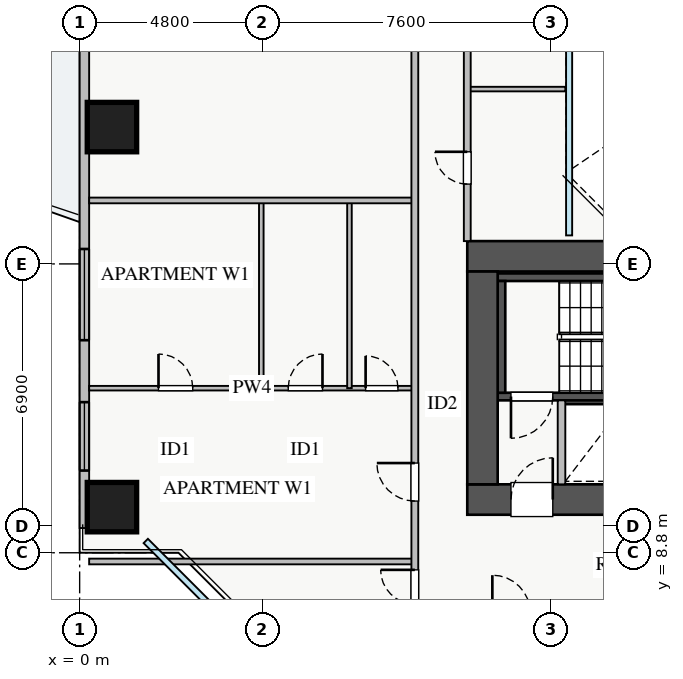
"""IFC4 building model, lengths in metres.
Left out: names, types, materials, properties, quantities, classifications, styles, units other than length and angle.
Written with IfcOpenShell. Run it as: python <this file> out.ifc"""

import sys

from ifc_helpers import new_model, si_unit, direction, frame, frame_2d, origin, origin_2d, place, context, subcontext, project, spatial, rectangle, extrude, source, transform, mapped, element, fill, save


model = new_model("IFC4")
c1 = context("Model", 3, precision=1e-05, world=origin(), true_north=direction((0.0, 1.0)))
c2 = subcontext(c1, "Body", "Model", "MODEL_VIEW")
j1 = project(units=[si_unit("LENGTHUNIT", "METRE"), si_unit("PLANEANGLEUNIT", "RADIAN")], contexts=[c1])
p1 = place(None, origin())
s1 = spatial("IfcSite", under=j1, at=p1, CompositionType="ELEMENT")
p2 = place(p1, origin())
s2 = spatial("IfcBuilding", under=s1, at=p2, CompositionType="ELEMENT")
p3 = place(p2, frame((0.0, 0.0, 50.25)))
s3 = spatial("IfcBuildingStorey", under=s2, at=p3, CompositionType="ELEMENT", Elevation=50.25)
p4 = place(p3, frame((12.68, 12.8, 0.0), z_axis=(0.0, 0.0, 1.0), x_axis=(1.0, 0.0, 0.0)))
e1 = element("IfcWall", 1, at=p4, inside=s3, PredefinedType="SHEAR", context=c2, shape_type="SweptSolid", body=[
    extrude(rectangle(XDim=1.94, YDim=0.18, at=frame_2d((0.97, 0.0))), origin(), (0.0, 0.0, 1.0), 3.07),
])
p5 = place(p3, frame((11.0, 12.91, 0.0), z_axis=(0.0, 0.0, 1.0), x_axis=(1.0, 0.0, 0.0)))
e2 = element("IfcWall", 2, at=p5, inside=s3, PredefinedType="SHEAR", context=c2, shape_type="SweptSolid", body=[
    extrude(rectangle(XDim=7.15, YDim=0.2, at=frame_2d((3.575, 0.0))), origin(), (0.0, 0.0, 1.0), 3.25),
])
p6 = place(p5, frame((0.35, 0.0, 0.0)))
e3 = element("IfcOpeningElement", 3, at=p6, cuts=e2, PredefinedType="OPENING", context=c2, shape_type="SweptSolid", body=[
    extrude(rectangle(XDim=1.1, YDim=2.05, at=frame_2d((0.55, 1.025))), frame((0.0, 0.11, 0.0), z_axis=(0.0, -1.0, 0.0), x_axis=(1.0, 0.0, 0.0)), (0.0, 0.0, 1.0), 0.22),
])
p7 = place(p3, frame((11.0, 16.05, 0.0), z_axis=(0.0, 0.0, 1.0), x_axis=(1.0, 0.0, 0.0)))
e4 = element("IfcWall", 4, at=p7, inside=s3, PredefinedType="SHEAR", context=c2, shape_type="SweptSolid", body=[
    extrude(rectangle(XDim=7.15, YDim=0.2, at=frame_2d((3.575, 0.0))), origin(), (0.0, 0.0, 1.0), 3.25),
])
p8 = place(p3, frame((11.1, 13.01, 0.0), z_axis=(0.0, 0.0, 1.0), x_axis=(0.0, 1.0, 0.0)))
e5 = element("IfcWall", 5, at=p8, inside=s3, PredefinedType="SHEAR", context=c2, shape_type="SweptSolid", body=[
    extrude(rectangle(XDim=2.94, YDim=0.2, at=frame_2d((1.47, 0.0))), origin(), (0.0, 0.0, 1.0), 3.25),
])
p9 = place(p3, frame((10.2, 10.2, 0.0), z_axis=(0.0, 0.0, 1.0), x_axis=(1.0, 0.0, 0.0)))
e6 = element("IfcWall", 6, at=p9, inside=s3, PredefinedType="SHEAR", context=c2, shape_type="SweptSolid", body=[
    extrude(rectangle(XDim=17.6, YDim=0.8, at=frame_2d((8.8, 0.0))), origin(), (0.0, 0.0, 1.0), 3.25),
])
p10 = place(p9, frame((1.15, 0.0, 0.0)))
e7 = element("IfcOpeningElement", 7, at=p10, cuts=e6, PredefinedType="OPENING", context=c2, shape_type="SweptSolid", body=[
    extrude(rectangle(XDim=1.1, YDim=2.05, at=frame_2d((0.55, 1.025))), frame((0.0, 0.41, 0.0), z_axis=(0.0, -1.0, 0.0), x_axis=(1.0, 0.0, 0.0)), (0.0, 0.0, 1.0), 0.82),
])
p11 = place(p9, frame((8.3, 0.0, 0.0)))
e8 = element("IfcOpeningElement", 8, at=p11, cuts=e6, PredefinedType="OPENING", context=c2, shape_type="SweptSolid", body=[
    extrude(rectangle(XDim=1.1, YDim=2.05, at=frame_2d((0.55, 1.025))), frame((0.0, 0.41, 0.0), z_axis=(0.0, -1.0, 0.0), x_axis=(1.0, 0.0, 0.0)), (0.0, 0.0, 1.0), 0.82),
])
p12 = place(p9, frame((10.05, 0.0, 0.0)))
e9 = element("IfcOpeningElement", 9, at=p12, cuts=e6, PredefinedType="OPENING", context=c2, shape_type="SweptSolid", body=[
    extrude(rectangle(XDim=1.1, YDim=2.05, at=frame_2d((0.55, 1.025))), frame((0.0, 0.41, 0.0), z_axis=(0.0, -1.0, 0.0), x_axis=(1.0, 0.0, 0.0)), (0.0, 0.0, 1.0), 0.82),
])
p13 = place(p9, frame((14.74, 0.0, 0.0)))
e10 = element("IfcOpeningElement", 10, at=p13, cuts=e6, PredefinedType="OPENING", context=c2, shape_type="SweptSolid", body=[
    extrude(rectangle(XDim=1.0, YDim=2.05, at=frame_2d((0.5, 1.025))), frame((0.0, 0.41, 0.0), z_axis=(0.0, -1.0, 0.0), x_axis=(1.0, 0.0, 0.0)), (0.0, 0.0, 1.0), 0.82),
])
p14 = place(p9, frame((12.585, 0.0, 0.0)))
e11 = element("IfcOpeningElement", 11, at=p14, cuts=e6, PredefinedType="OPENING", context=c2, shape_type="SweptSolid", body=[
    extrude(rectangle(XDim=1.0, YDim=2.05, at=frame_2d((0.5, 1.025))), frame((0.0, 0.41, 0.0), z_axis=(0.0, -1.0, 0.0), x_axis=(1.0, 0.0, 0.0)), (0.0, 0.0, 1.0), 0.82),
])
p15 = place(p3, frame((10.2, 16.6, 0.0), z_axis=(0.0, 0.0, 1.0), x_axis=(1.0, 0.0, 0.0)))
e12 = element("IfcWall", 12, at=p15, inside=s3, PredefinedType="SHEAR", context=c2, shape_type="SweptSolid", body=[
    extrude(rectangle(XDim=17.6, YDim=0.8, at=frame_2d((8.8, 0.0))), origin(), (0.0, 0.0, 1.0), 3.25),
])
p16 = place(p3, frame((10.6, 10.6, 0.0), z_axis=(0.0, 0.0, 1.0), x_axis=(0.0, 1.0, 0.0)))
e13 = element("IfcWall", 13, at=p16, inside=s3, PredefinedType="SHEAR", context=c2, shape_type="SweptSolid", body=[
    extrude(rectangle(XDim=5.6, YDim=0.8, at=frame_2d((2.8, 0.0))), origin(), (0.0, 0.0, 1.0), 3.25),
])
m1 = source(origin(), c2, "Body", "SweptSolid", [
    extrude(rectangle(XDim=1.3, YDim=1.3, at=origin_2d()), origin(), (0.0, 0.0, 1.0), 3.25),
])
for number, where, z_axis, x_axis in (
    (14, (0.85, 20.0, 0.0), (0.0, 0.0, 1.0), (1.0, 0.0, 0.0)),
    (15, (0.85, 10.0, 0.0), (0.0, 0.0, 1.0), (1.0, 0.0, 0.0)),
):
    element("IfcColumn", number, at=place(p3, frame(where, z_axis=z_axis, x_axis=x_axis)), inside=s3, PredefinedType="COLUMN", context=c2, shape_type="MappedRepresentation", body=[
        mapped(m1, transform((0.0, 0.0, 0.0), x_axis=(1.0, 0.0, 0.0), y_axis=(0.0, 1.0, 0.0), z_axis=(0.0, 0.0, 1.0), scale=1.0)),
    ])
p17 = place(p3, frame((0.125, 9.45, 0.0), z_axis=(0.0, 0.0, 1.0), x_axis=(0.0, 1.0, 0.0)))
e16 = element("IfcWall", 16, at=p17, inside=s3, PredefinedType="STANDARD", context=c2, shape_type="SweptSolid", body=[
    extrude(rectangle(XDim=27.1, YDim=0.25, at=frame_2d((13.55, 0.0))), origin(), (0.0, 0.0, 1.0), 2.61),
])
p18 = place(p17, frame((14.4, 0.0, 0.0)))
e17 = element("IfcOpeningElement", 17, at=p18, cuts=e16, PredefinedType="OPENING", context=c2, shape_type="SweptSolid", body=[
    extrude(rectangle(XDim=1.2, YDim=2.1, at=frame_2d((0.6, 1.05))), frame((0.0, 0.135, 0.0), z_axis=(0.0, -1.0, 0.0), x_axis=(1.0, 0.0, 0.0)), (0.0, 0.0, 1.0), 0.27),
])
p19 = place(p17, frame((1.512, 0.0, 0.9)))
e18 = element("IfcOpeningElement", 18, at=p19, cuts=e16, PredefinedType="OPENING", context=c2, shape_type="SweptSolid", body=[
    extrude(rectangle(XDim=1.8, YDim=1.5, at=frame_2d((0.9, 0.75))), frame((0.0, 0.135, 0.0), z_axis=(0.0, -1.0, 0.0), x_axis=(1.0, 0.0, 0.0)), (0.0, 0.0, 1.0), 0.27),
])
p20 = place(p17, frame((23.272, 0.0, 0.9)))
e19 = element("IfcOpeningElement", 19, at=p20, cuts=e16, PredefinedType="OPENING", context=c2, shape_type="SweptSolid", body=[
    extrude(rectangle(XDim=2.1, YDim=1.5, at=frame_2d((1.05, 0.75))), frame((0.0, 0.135, 0.0), z_axis=(0.0, -1.0, 0.0), x_axis=(1.0, 0.0, 0.0)), (0.0, 0.0, 1.0), 0.27),
])
p21 = place(p17, frame((4.942, 0.0, 0.9)))
e20 = element("IfcOpeningElement", 20, at=p21, cuts=e16, PredefinedType="OPENING", context=c2, shape_type="SweptSolid", body=[
    extrude(rectangle(XDim=2.4, YDim=1.5, at=frame_2d((1.2, 0.75))), frame((0.0, 0.135, 0.0), z_axis=(0.0, -1.0, 0.0), x_axis=(1.0, 0.0, 0.0)), (0.0, 0.0, 1.0), 0.27),
])
p22 = place(p17, frame((18.365, 0.0, 0.9)))
e21 = element("IfcOpeningElement", 21, at=p22, cuts=e16, PredefinedType="OPENING", context=c2, shape_type="SweptSolid", body=[
    extrude(rectangle(XDim=0.9, YDim=1.2, at=frame_2d((0.45, 0.6))), frame((0.0, 0.135, 0.0), z_axis=(0.0, -1.0, 0.0), x_axis=(1.0, 0.0, 0.0)), (0.0, 0.0, 1.0), 0.27),
])
p23 = place(p3, frame((12.68, 10.6, 0.0), z_axis=(0.0, 0.0, 1.0), x_axis=(0.0, 1.0, 0.0)))
e22 = element("IfcWall", 22, at=p23, inside=s3, PredefinedType="PARTITIONING", context=c2, shape_type="SweptSolid", body=[
    extrude(rectangle(XDim=2.21, YDim=0.2, at=frame_2d((1.105, 0.0))), origin(), (0.0, 0.0, 1.0), 3.07),
])
p24 = place(p3, frame((0.25, 8.57, 0.0), z_axis=(0.0, 0.0, 1.0), x_axis=(1.0, 0.0, 0.0)))
e23 = element("IfcWall", 23, at=p24, inside=s3, PredefinedType="PARTITIONING", context=c2, shape_type="SweptSolid", body=[
    extrude(rectangle(XDim=8.57, YDim=0.15, at=frame_2d((4.285, 0.0))), origin(), (0.0, 0.0, 1.0), 3.07),
])
p25 = place(p3, frame((0.25, 13.13, 0.0), z_axis=(0.0, 0.0, 1.0), x_axis=(1.0, 0.0, 0.0)))
e24 = element("IfcWall", 24, at=p25, inside=s3, PredefinedType="PLUMBINGWALL", context=c2, shape_type="SweptSolid", body=[
    extrude(rectangle(XDim=8.57, YDim=0.12, at=frame_2d((4.285, 0.0))), origin(), (0.0, 0.0, 1.0), 3.07),
])
p26 = place(p25, frame((1.825, 0.0, 0.0)))
e25 = element("IfcOpeningElement", 25, at=p26, cuts=e24, PredefinedType="OPENING", context=c2, shape_type="SweptSolid", body=[
    extrude(rectangle(XDim=0.9, YDim=2.05, at=frame_2d((0.45, 1.025))), frame((0.0, 0.07, 0.0), z_axis=(0.0, -1.0, 0.0), x_axis=(1.0, 0.0, 0.0)), (0.0, 0.0, 1.0), 0.14),
])
p27 = place(p25, frame((5.24, 0.0, 0.0)))
e26 = element("IfcOpeningElement", 26, at=p27, cuts=e24, PredefinedType="OPENING", context=c2, shape_type="SweptSolid", body=[
    extrude(rectangle(XDim=0.9, YDim=2.05, at=frame_2d((0.45, 1.025))), frame((0.0, 0.07, 0.0), z_axis=(0.0, -1.0, 0.0), x_axis=(1.0, 0.0, 0.0)), (0.0, 0.0, 1.0), 0.14),
])
p28 = place(p25, frame((7.275, 0.0, 0.0)))
e27 = element("IfcOpeningElement", 27, at=p28, cuts=e24, PredefinedType="OPENING", context=c2, shape_type="SweptSolid", body=[
    extrude(rectangle(XDim=0.85, YDim=2.05, at=frame_2d((0.425, 1.025))), frame((0.0, 0.07, 0.0), z_axis=(0.0, -1.0, 0.0), x_axis=(1.0, 0.0, 0.0)), (0.0, 0.0, 1.0), 0.14),
])
for number, where, z_axis, x_axis in (
    (28, (4.78, 13.13, 0.0), (0.0, 0.0, 1.0), (0.0, 1.0, 0.0)),
    (29, (7.1, 13.13, 0.0), (0.0, 0.0, 1.0), (0.0, 1.0, 0.0)),
):
    element("IfcWall", number, at=place(p3, frame(where, z_axis=z_axis, x_axis=x_axis)), inside=s3, PredefinedType="PLUMBINGWALL", context=c2, shape_type="SweptSolid", body=[
        extrude(rectangle(XDim=4.94, YDim=0.12, at=frame_2d((2.47, 0.0))), origin(), (0.0, 0.0, 1.0), 3.07),
    ])
p29 = place(p3, frame((0.25, 18.07, 0.0), z_axis=(0.0, 0.0, 1.0), x_axis=(1.0, 0.0, 0.0)))
e30 = element("IfcWall", 30, at=p29, inside=s3, PredefinedType="PARTITIONING", context=c2, shape_type="SweptSolid", body=[
    extrude(rectangle(XDim=8.57, YDim=0.15, at=frame_2d((4.285, 0.0))), origin(), (0.0, 0.0, 1.0), 2.821),
])
p30 = place(p3, frame((8.82, 7.21, 0.0), z_axis=(0.0, 0.0, 1.0), x_axis=(0.0, 1.0, 0.0)))
e31 = element("IfcWall", 31, at=p30, inside=s3, PredefinedType="PARTITIONING", context=c2, shape_type="SweptSolid", body=[
    extrude(rectangle(XDim=31.23, YDim=0.18, at=frame_2d((15.615, 0.0))), origin(), (0.0, 0.0, 1.0), 3.07),
])
p31 = place(p30, frame((30.09, 0.0, 0.0)))
e32 = element("IfcOpeningElement", 32, at=p31, cuts=e31, PredefinedType="OPENING", context=c2, shape_type="SweptSolid", body=[
    extrude(rectangle(XDim=0.9, YDim=2.05, at=frame_2d((0.45, 1.025))), frame((0.0, 0.1, 0.0), z_axis=(0.0, -1.0, 0.0), x_axis=(1.0, 0.0, 0.0)), (0.0, 0.0, 1.0), 0.2),
])
p32 = place(p30, frame((0.24, 0.0, 0.0)))
e33 = element("IfcOpeningElement", 33, at=p32, cuts=e31, PredefinedType="OPENING", context=c2, shape_type="SweptSolid", body=[
    extrude(rectangle(XDim=0.9, YDim=2.05, at=frame_2d((0.45, 1.025))), frame((0.0, 0.1, 0.0), z_axis=(0.0, -1.0, 0.0), x_axis=(1.0, 0.0, 0.0)), (0.0, 0.0, 1.0), 0.2),
])
p33 = place(p30, frame((2.95, 0.0, 0.0)))
e34 = element("IfcOpeningElement", 34, at=p33, cuts=e31, PredefinedType="OPENING", context=c2, shape_type="SweptSolid", body=[
    extrude(rectangle(XDim=1.0, YDim=2.05, at=frame_2d((0.5, 1.025))), frame((0.0, 0.1, 0.0), z_axis=(0.0, -1.0, 0.0), x_axis=(1.0, 0.0, 0.0)), (0.0, 0.0, 1.0), 0.2),
])
p34 = place(p30, frame((15.115, 0.0, 0.0)))
e35 = element("IfcOpeningElement", 35, at=p34, cuts=e31, PredefinedType="OPENING", context=c2, shape_type="SweptSolid", body=[
    extrude(rectangle(XDim=1.0, YDim=2.05, at=frame_2d((0.5, 1.025))), frame((0.0, 0.1, 0.0), z_axis=(0.0, -1.0, 0.0), x_axis=(1.0, 0.0, 0.0)), (0.0, 0.0, 1.0), 0.2),
])
p35 = place(p30, frame((21.96, 0.0, 0.0)))
e36 = element("IfcOpeningElement", 36, at=p35, cuts=e31, PredefinedType="OPENING", context=c2, shape_type="SweptSolid", body=[
    extrude(rectangle(XDim=1.0, YDim=2.05, at=frame_2d((0.5, 1.025))), frame((0.0, 0.1, 0.0), z_axis=(0.0, -1.0, 0.0), x_axis=(1.0, 0.0, 0.0)), (0.0, 0.0, 1.0), 0.2),
])
p36 = place(p3, frame((10.2, 21.0, 0.0), z_axis=(0.0, 0.0, 1.0), x_axis=(1.0, 0.0, 0.0)))
e37 = element("IfcWall", 37, at=p36, inside=s3, PredefinedType="PLUMBINGWALL", context=c2, shape_type="SweptSolid", body=[
    extrude(rectangle(XDim=2.58, YDim=0.12, at=frame_2d((1.29, 0.0))), origin(), (0.0, 0.0, 1.0), 3.07),
])
p37 = place(p3, frame((10.2, 17.0, 0.0), z_axis=(0.0, 0.0, 1.0), x_axis=(0.0, 1.0, 0.0)))
e38 = element("IfcWall", 38, at=p37, inside=s3, PredefinedType="PARTITIONING", context=c2, shape_type="SweptSolid", body=[
    extrude(rectangle(XDim=12.0, YDim=0.18, at=frame_2d((6.0, 0.0))), origin(), (0.0, 0.0, 1.0), 3.07),
])
p38 = place(p37, frame((1.5, 0.0, 0.0)))
e39 = element("IfcOpeningElement", 39, at=p38, cuts=e38, PredefinedType="OPENING", context=c2, shape_type="SweptSolid", body=[
    extrude(rectangle(XDim=0.85, YDim=2.05, at=frame_2d((0.425, 1.025))), frame((0.0, 0.1, 0.0), z_axis=(0.0, -1.0, 0.0), x_axis=(1.0, 0.0, 0.0)), (0.0, 0.0, 1.0), 0.2),
])
p39 = place(p37, frame((6.5, 0.0, 0.0)))
e40 = element("IfcOpeningElement", 40, at=p39, cuts=e38, PredefinedType="OPENING", context=c2, shape_type="SweptSolid", body=[
    extrude(rectangle(XDim=1.0, YDim=2.05, at=frame_2d((0.5, 1.025))), frame((0.0, 0.1, 0.0), z_axis=(0.0, -1.0, 0.0), x_axis=(1.0, 0.0, 0.0)), (0.0, 0.0, 1.0), 0.2),
])
m2 = source(origin(), c2, "Body", "SweptSolid", [
    extrude(rectangle(XDim=1.8, YDim=1.5, at=frame_2d((0.9, 0.75))), frame((0.0, 0.03, 0.0), z_axis=(0.0, -1.0, 0.0), x_axis=(1.0, 0.0, 0.0)), (0.0, 0.0, 1.0), 0.06),
])
p40 = place(p19, origin())
e41 = element("IfcWindow", 41, at=p40, inside=s3, PartitioningType="TRIPLE_PANEL_VERTICAL", PredefinedType="WINDOW", context=c2, shape_type="MappedRepresentation", body=[
    mapped(m2, transform((0.0, 0.0, 0.0), x_axis=(1.0, 0.0, 0.0), y_axis=(0.0, 1.0, 0.0), z_axis=(0.0, 0.0, 1.0), scale=1.0)),
])
fill(e18, e41)
m3 = source(origin(), c2, "Body", "SweptSolid", [
    extrude(rectangle(XDim=1.1, YDim=2.05, at=frame_2d((0.55, 1.025))), frame((0.0, 0.025, 0.0), z_axis=(0.0, -1.0, 0.0), x_axis=(1.0, 0.0, 0.0)), (0.0, 0.0, 1.0), 0.05),
])
p41 = place(p10, origin())
e42 = element("IfcDoor", 42, at=p41, inside=s3, OperationType="SINGLE_SWING_RIGHT", PredefinedType="DOOR", context=c2, shape_type="MappedRepresentation", body=[
    mapped(m3, transform((0.0, 0.0, 0.0), x_axis=(1.0, 0.0, 0.0), y_axis=(0.0, 1.0, 0.0), z_axis=(0.0, 0.0, 1.0), scale=1.0)),
])
fill(e7, e42)
p42 = place(p6, frame((1.1, 0.0, 0.0), z_axis=(0.0, 0.0, 1.0), x_axis=(-1.0, 0.0, 0.0)))
e43 = element("IfcDoor", 43, at=p42, inside=s3, OperationType="SINGLE_SWING_LEFT", PredefinedType="DOOR", context=c2, shape_type="MappedRepresentation", body=[
    mapped(m3, transform((0.0, 0.0, 0.0), x_axis=(1.0, 0.0, 0.0), y_axis=(0.0, 1.0, 0.0), z_axis=(0.0, 0.0, 1.0), scale=1.0)),
])
fill(e3, e43)
m4 = source(origin(), c2, "Body", "SweptSolid", [
    extrude(rectangle(XDim=0.9, YDim=2.05, at=frame_2d((0.45, 1.025))), frame((0.0, 0.025, 0.0), z_axis=(0.0, -1.0, 0.0), x_axis=(1.0, 0.0, 0.0)), (0.0, 0.0, 1.0), 0.05),
])
p43 = place(p26, origin())
e44 = element("IfcDoor", 44, at=p43, inside=s3, OperationType="SINGLE_SWING_LEFT", PredefinedType="DOOR", context=c2, shape_type="MappedRepresentation", body=[
    mapped(m4, transform((0.0, 0.0, 0.0), x_axis=(1.0, 0.0, 0.0), y_axis=(0.0, 1.0, 0.0), z_axis=(0.0, 0.0, 1.0), scale=1.0)),
])
fill(e25, e44)
p44 = place(p27, origin())
e45 = element("IfcDoor", 45, at=p44, inside=s3, OperationType="SINGLE_SWING_RIGHT", PredefinedType="DOOR", context=c2, shape_type="MappedRepresentation", body=[
    mapped(m4, transform((0.0, 0.0, 0.0), x_axis=(1.0, 0.0, 0.0), y_axis=(0.0, 1.0, 0.0), z_axis=(0.0, 0.0, 1.0), scale=1.0)),
])
fill(e26, e45)
m5 = source(origin(), c2, "Body", "SweptSolid", [
    extrude(rectangle(XDim=0.85, YDim=2.05, at=frame_2d((0.425, 1.025))), frame((0.0, 0.025, 0.0), z_axis=(0.0, -1.0, 0.0), x_axis=(1.0, 0.0, 0.0)), (0.0, 0.0, 1.0), 0.05),
])
p45 = place(p28, origin())
e46 = element("IfcDoor", 46, at=p45, inside=s3, OperationType="SINGLE_SWING_LEFT", PredefinedType="DOOR", context=c2, shape_type="MappedRepresentation", body=[
    mapped(m5, transform((0.0, 0.0, 0.0), x_axis=(1.0, 0.0, 0.0), y_axis=(0.0, 1.0, 0.0), z_axis=(0.0, 0.0, 1.0), scale=1.0)),
])
fill(e27, e46)
p46 = place(p32, origin())
e47 = element("IfcDoor", 47, at=p46, inside=s3, OperationType="SINGLE_SWING_RIGHT", PredefinedType="DOOR", context=c2, shape_type="MappedRepresentation", body=[
    mapped(m4, transform((0.0, 0.0, 0.0), x_axis=(1.0, 0.0, 0.0), y_axis=(0.0, 1.0, 0.0), z_axis=(0.0, 0.0, 1.0), scale=1.0)),
])
fill(e33, e47)
m6 = source(origin(), c2, "Body", "SweptSolid", [
    extrude(rectangle(XDim=1.0, YDim=2.05, at=frame_2d((0.5, 1.025))), frame((0.0, 0.025, 0.0), z_axis=(0.0, -1.0, 0.0), x_axis=(1.0, 0.0, 0.0)), (0.0, 0.0, 1.0), 0.05),
])
p47 = place(p33, origin())
e48 = element("IfcDoor", 48, at=p47, inside=s3, OperationType="SINGLE_SWING_RIGHT", PredefinedType="DOOR", context=c2, shape_type="MappedRepresentation", body=[
    mapped(m6, transform((0.0, 0.0, 0.0), x_axis=(1.0, 0.0, 0.0), y_axis=(0.0, 1.0, 0.0), z_axis=(0.0, 0.0, 1.0), scale=1.0)),
])
fill(e34, e48)
p48 = place(p38, origin())
e49 = element("IfcDoor", 49, at=p48, inside=s3, OperationType="SINGLE_SWING_RIGHT", PredefinedType="DOOR", context=c2, shape_type="MappedRepresentation", body=[
    mapped(m5, transform((0.0, 0.0, 0.0), x_axis=(1.0, 0.0, 0.0), y_axis=(0.0, 1.0, 0.0), z_axis=(0.0, 0.0, 1.0), scale=1.0)),
])
fill(e39, e49)
m7 = source(origin(), c2, "Body", "SweptSolid", [
    extrude(rectangle(XDim=2.4, YDim=1.5, at=frame_2d((1.2, 0.75))), frame((0.0, 0.03, 0.0), z_axis=(0.0, -1.0, 0.0), x_axis=(1.0, 0.0, 0.0)), (0.0, 0.0, 1.0), 0.06),
])
p49 = place(p21, origin())
e50 = element("IfcWindow", 50, at=p49, inside=s3, PartitioningType="TRIPLE_PANEL_VERTICAL", PredefinedType="WINDOW", context=c2, shape_type="MappedRepresentation", body=[
    mapped(m7, transform((0.0, 0.0, 0.0), x_axis=(1.0, 0.0, 0.0), y_axis=(0.0, 1.0, 0.0), z_axis=(0.0, 0.0, 1.0), scale=1.0)),
])
fill(e20, e50)
save(model, sys.argv[1])
